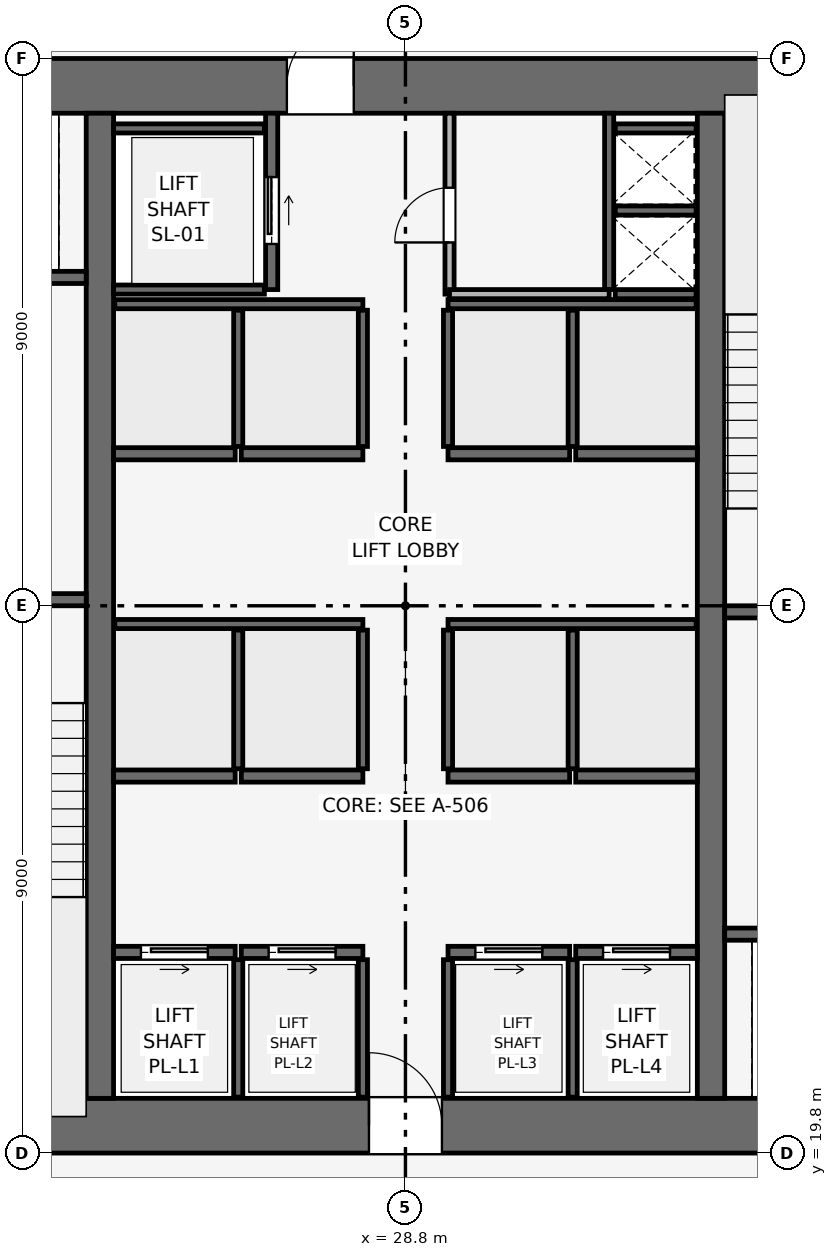
"""IFC4 building model, lengths in metres.
Left out: names, types, materials, properties, quantities, classifications, styles, units other than length and angle.
Written with IfcOpenShell. Run it as: python <this file> out.ifc"""

import sys

from ifc_helpers import new_model, si_unit, direction, frame, frame_2d, origin, place, context, subcontext, project, spatial, rectangle, extrude, element, fill, save


model = new_model("IFC4")
c1 = context("Model", 3, precision=1e-05, world=origin(), true_north=direction((0.0, 1.0)))
c2 = subcontext(c1, "Body", "Model", "MODEL_VIEW")
j1 = project(units=[si_unit("LENGTHUNIT", "METRE"), si_unit("PLANEANGLEUNIT", "RADIAN")], contexts=[c1])
p1 = place(None, origin())
s1 = spatial("IfcSite", under=j1, at=p1, CompositionType="ELEMENT")
p2 = place(p1, origin())
s2 = spatial("IfcBuilding", under=s1, at=p2, CompositionType="ELEMENT")
p3 = place(p2, frame((0.0, 0.0, 121.2)))
s3 = spatial("IfcBuildingStorey", under=s2, at=p3, CompositionType="ELEMENT", Elevation=121.2)
p4 = place(p3, frame((19.8, 20.25, 0.0), z_axis=(0.0, 0.0, 1.0), x_axis=(1.0, 0.0, 0.0)))
e1 = element("IfcWall", 1, at=p4, inside=s3, PredefinedType="SHEAR", context=c2, shape_type="SweptSolid", body=[
    extrude(rectangle(XDim=18.0, YDim=0.9, at=frame_2d((9.0, 0.0))), origin(), (0.0, 0.0, 1.0), 3.9),
])
p5 = place(p4, frame((8.4, 0.0, 0.0)))
e2 = element("IfcOpeningElement", 2, at=p5, cuts=e1, PredefinedType="OPENING", context=c2, shape_type="SweptSolid", body=[
    extrude(rectangle(XDim=1.2, YDim=2.2, at=frame_2d((0.6, 1.1))), frame((0.0, 0.46, 0.0), z_axis=(0.0, -1.0, 0.0), x_axis=(1.0, 0.0, 0.0)), (0.0, 0.0, 1.0), 0.92),
])
p6 = place(p3, frame((19.8, 37.35, 0.0), z_axis=(0.0, 0.0, 1.0), x_axis=(1.0, 0.0, 0.0)))
e3 = element("IfcWall", 3, at=p6, inside=s3, PredefinedType="SHEAR", context=c2, shape_type="SweptSolid", body=[
    extrude(rectangle(XDim=18.0, YDim=0.9, at=frame_2d((9.0, 0.0))), origin(), (0.0, 0.0, 1.0), 3.9),
])
p7 = place(p6, frame((7.05, 0.0, 0.0)))
e4 = element("IfcOpeningElement", 4, at=p7, cuts=e3, PredefinedType="OPENING", context=c2, shape_type="SweptSolid", body=[
    extrude(rectangle(XDim=1.1, YDim=2.15, at=frame_2d((0.55, 1.075))), frame((0.0, 0.46, 0.0), z_axis=(0.0, -1.0, 0.0), x_axis=(1.0, 0.0, 0.0)), (0.0, 0.0, 1.0), 0.92),
])
for number, where, z_axis, x_axis in (
    (5, (23.775, 20.7, 0.0), (0.0, 0.0, 1.0), (0.0, 1.0, 0.0)),
    (6, (33.825, 20.7, 0.0), (0.0, 0.0, 1.0), (0.0, 1.0, 0.0)),
):
    element("IfcWall", number, at=place(p3, frame(where, z_axis=z_axis, x_axis=x_axis)), inside=s3, PredefinedType="SHEAR", context=c2, shape_type="SweptSolid", body=[
        extrude(rectangle(XDim=16.2, YDim=0.45, at=frame_2d((8.1, 0.0))), origin(), (0.0, 0.0, 1.0), 3.9),
    ])
p8 = place(p3, frame((20.4, 28.9, 0.0), z_axis=(0.0, 0.0, 1.0), x_axis=(1.0, 0.0, 0.0)))
e7 = element("IfcWall", 7, at=p8, inside=s3, PredefinedType="SHEAR", context=c2, shape_type="SweptSolid", body=[
    extrude(rectangle(XDim=3.15, YDim=0.2, at=frame_2d((1.575, 0.0))), origin(), (0.0, 0.0, 1.0), 3.65),
])
p9 = place(p8, frame((0.8, 0.0, 0.0)))
e8 = element("IfcOpeningElement", 8, at=p9, cuts=e7, PredefinedType="OPENING", context=c2, shape_type="SweptSolid", body=[
    extrude(rectangle(XDim=1.0, YDim=2.1, at=frame_2d((0.5, 1.05))), frame((0.0, 0.11, 0.0), z_axis=(0.0, -1.0, 0.0), x_axis=(1.0, 0.0, 0.0)), (0.0, 0.0, 1.0), 0.22),
])
p10 = place(p3, frame((34.05, 28.7, 0.0), z_axis=(0.0, 0.0, 1.0), x_axis=(1.0, 0.0, 0.0)))
e9 = element("IfcWall", 9, at=p10, inside=s3, PredefinedType="SHEAR", context=c2, shape_type="SweptSolid", body=[
    extrude(rectangle(XDim=3.15, YDim=0.2, at=frame_2d((1.575, 0.0))), origin(), (0.0, 0.0, 1.0), 3.65),
])
p11 = place(p10, frame((0.8, 0.0, 0.0)))
e10 = element("IfcOpeningElement", 10, at=p11, cuts=e9, PredefinedType="OPENING", context=c2, shape_type="SweptSolid", body=[
    extrude(rectangle(XDim=1.0, YDim=2.1, at=frame_2d((0.5, 1.05))), frame((0.0, 0.11, 0.0), z_axis=(0.0, -1.0, 0.0), x_axis=(1.0, 0.0, 0.0)), (0.0, 0.0, 1.0), 0.22),
])
p12 = place(p3, frame((32.15, 34.0, 0.0), z_axis=(0.0, 0.0, 1.0), x_axis=(0.0, 1.0, 0.0)))
e11 = element("IfcWall", 11, at=p12, inside=s3, PredefinedType="SHEAR", context=c2, shape_type="SweptSolid", body=[
    extrude(rectangle(XDim=2.9, YDim=0.15, at=frame_2d((1.45, 0.0))), origin(), (0.0, 0.0, 1.0), 3.65),
])
for number, where, z_axis, x_axis in (
    (12, (32.25, 33.925, 0.0), (0.0, 0.0, 1.0), (1.0, 0.0, 0.0)),
    (13, (32.25, 35.3, 0.0), (0.0, 0.0, 1.0), (1.0, 0.0, 0.0)),
):
    element("IfcWall", number, at=place(p3, frame(where, z_axis=z_axis, x_axis=x_axis)), inside=s3, PredefinedType="SHEAR", context=c2, shape_type="SweptSolid", body=[
        extrude(rectangle(XDim=1.33, YDim=0.15, at=frame_2d((0.665, 0.0))), origin(), (0.0, 0.0, 1.0), 3.65),
    ])
p13 = place(p3, frame((20.5, 34.2, 0.0), z_axis=(0.0, 0.0, 1.0), x_axis=(1.0, 0.0, 0.0)))
e14 = element("IfcWall", 14, at=p13, inside=s3, PredefinedType="SHEAR", context=c2, shape_type="SweptSolid", body=[
    extrude(rectangle(XDim=3.05, YDim=0.2, at=frame_2d((1.525, 0.0))), origin(), (0.0, 0.0, 1.0), 3.65),
])
p14 = place(p13, frame((0.75, 0.0, 0.0)))
e15 = element("IfcOpeningElement", 15, at=p14, cuts=e14, PredefinedType="OPENING", context=c2, shape_type="SweptSolid", body=[
    extrude(rectangle(XDim=1.1, YDim=2.15, at=frame_2d((0.55, 1.075))), frame((0.0, 0.11, 0.0), z_axis=(0.0, -1.0, 0.0), x_axis=(1.0, 0.0, 0.0)), (0.0, 0.0, 1.0), 0.22),
])
p15 = place(p3, frame((34.05, 23.4, 0.0), z_axis=(0.0, 0.0, 1.0), x_axis=(1.0, 0.0, 0.0)))
e16 = element("IfcWall", 16, at=p15, inside=s3, PredefinedType="SHEAR", context=c2, shape_type="SweptSolid", body=[
    extrude(rectangle(XDim=3.05, YDim=0.2, at=frame_2d((1.525, 0.0))), origin(), (0.0, 0.0, 1.0), 3.65),
])
p16 = place(p15, frame((1.2, 0.0, 0.0)))
e17 = element("IfcOpeningElement", 17, at=p16, cuts=e16, PredefinedType="OPENING", context=c2, shape_type="SweptSolid", body=[
    extrude(rectangle(XDim=1.1, YDim=2.15, at=frame_2d((0.55, 1.075))), frame((0.0, 0.11, 0.0), z_axis=(0.0, -1.0, 0.0), x_axis=(1.0, 0.0, 0.0)), (0.0, 0.0, 1.0), 0.22),
])
p17 = place(p3, frame((26.6, 34.0, 0.0), z_axis=(0.0, 0.0, 1.0), x_axis=(0.0, 1.0, 0.0)))
e18 = element("IfcWall", 18, at=p17, inside=s3, PredefinedType="SHEAR", context=c2, shape_type="SweptSolid", body=[
    extrude(rectangle(XDim=2.9, YDim=0.2, at=frame_2d((1.45, 0.0))), origin(), (0.0, 0.0, 1.0), 3.65),
])
p18 = place(p17, frame((0.75, 0.0, 0.0)))
e19 = element("IfcOpeningElement", 19, at=p18, cuts=e18, PredefinedType="OPENING", context=c2, shape_type="SweptSolid", body=[
    extrude(rectangle(XDim=1.1, YDim=2.15, at=frame_2d((0.55, 1.075))), frame((0.0, 0.11, 0.0), z_axis=(0.0, -1.0, 0.0), x_axis=(1.0, 0.0, 0.0)), (0.0, 0.0, 1.0), 0.22),
])
for number, where, z_axis, x_axis in (
    (20, (24.0, 34.0, 0.0), (0.0, 0.0, 1.0), (1.0, 0.0, 0.0)),
    (21, (24.0, 36.65, 0.0), (0.0, 0.0, 1.0), (1.0, 0.0, 0.0)),
):
    element("IfcWall", number, at=place(p3, frame(where, z_axis=z_axis, x_axis=x_axis)), inside=s3, PredefinedType="SHEAR", context=c2, shape_type="SweptSolid", body=[
        extrude(rectangle(XDim=2.48, YDim=0.15, at=frame_2d((1.24, 0.0))), origin(), (0.0, 0.0, 1.0), 3.65),
    ])
p19 = place(p3, frame((24.0, 23.1, 0.0), z_axis=(0.0, 0.0, 1.0), x_axis=(1.0, 0.0, 0.0)))
e22 = element("IfcWall", 22, at=p19, inside=s3, PredefinedType="SHEAR", context=c2, shape_type="SweptSolid", body=[
    extrude(rectangle(XDim=2.0, YDim=0.2, at=frame_2d((1.0, 0.0))), origin(), (0.0, 0.0, 1.0), 3.65),
])
p20 = place(p19, frame((0.45, 0.0, 0.0)))
e23 = element("IfcOpeningElement", 23, at=p20, cuts=e22, PredefinedType="OPENING", context=c2, shape_type="SweptSolid", body=[
    extrude(rectangle(XDim=1.1, YDim=2.15, at=frame_2d((0.55, 1.075))), frame((0.0, 0.11, 0.0), z_axis=(0.0, -1.0, 0.0), x_axis=(1.0, 0.0, 0.0)), (0.0, 0.0, 1.0), 0.22),
])
p21 = place(p3, frame((26.1, 23.1, 0.0), z_axis=(0.0, 0.0, 1.0), x_axis=(1.0, 0.0, 0.0)))
e24 = element("IfcWall", 24, at=p21, inside=s3, PredefinedType="SHEAR", context=c2, shape_type="SweptSolid", body=[
    extrude(rectangle(XDim=2.0, YDim=0.2, at=frame_2d((1.0, 0.0))), origin(), (0.0, 0.0, 1.0), 3.65),
])
p22 = place(p21, frame((0.45, 0.0, 0.0)))
e25 = element("IfcOpeningElement", 25, at=p22, cuts=e24, PredefinedType="OPENING", context=c2, shape_type="SweptSolid", body=[
    extrude(rectangle(XDim=1.1, YDim=2.15, at=frame_2d((0.55, 1.075))), frame((0.0, 0.11, 0.0), z_axis=(0.0, -1.0, 0.0), x_axis=(1.0, 0.0, 0.0)), (0.0, 0.0, 1.0), 0.22),
])
p23 = place(p3, frame((29.5, 23.1, 0.0), z_axis=(0.0, 0.0, 1.0), x_axis=(1.0, 0.0, 0.0)))
e26 = element("IfcWall", 26, at=p23, inside=s3, PredefinedType="SHEAR", context=c2, shape_type="SweptSolid", body=[
    extrude(rectangle(XDim=2.0, YDim=0.2, at=frame_2d((1.0, 0.0))), origin(), (0.0, 0.0, 1.0), 3.65),
])
p24 = place(p23, frame((0.45, 0.0, 0.0)))
e27 = element("IfcOpeningElement", 27, at=p24, cuts=e26, PredefinedType="OPENING", context=c2, shape_type="SweptSolid", body=[
    extrude(rectangle(XDim=1.1, YDim=2.15, at=frame_2d((0.55, 1.075))), frame((0.0, 0.11, 0.0), z_axis=(0.0, -1.0, 0.0), x_axis=(1.0, 0.0, 0.0)), (0.0, 0.0, 1.0), 0.22),
])
p25 = place(p3, frame((31.6, 23.1, 0.0), z_axis=(0.0, 0.0, 1.0), x_axis=(1.0, 0.0, 0.0)))
e28 = element("IfcWall", 28, at=p25, inside=s3, PredefinedType="SHEAR", context=c2, shape_type="SweptSolid", body=[
    extrude(rectangle(XDim=2.0, YDim=0.2, at=frame_2d((1.0, 0.0))), origin(), (0.0, 0.0, 1.0), 3.65),
])
p26 = place(p25, frame((0.45, 0.0, 0.0)))
e29 = element("IfcOpeningElement", 29, at=p26, cuts=e28, PredefinedType="OPENING", context=c2, shape_type="SweptSolid", body=[
    extrude(rectangle(XDim=1.1, YDim=2.15, at=frame_2d((0.55, 1.075))), frame((0.0, 0.11, 0.0), z_axis=(0.0, -1.0, 0.0), x_axis=(1.0, 0.0, 0.0)), (0.0, 0.0, 1.0), 0.22),
])
for number, where, z_axis, x_axis in (
    (30, (24.0, 26.0, 0.0), (0.0, 0.0, 1.0), (1.0, 0.0, 0.0)),
    (31, (26.1, 26.0, 0.0), (0.0, 0.0, 1.0), (1.0, 0.0, 0.0)),
    (32, (29.5, 26.0, 0.0), (0.0, 0.0, 1.0), (1.0, 0.0, 0.0)),
    (33, (31.6, 26.0, 0.0), (0.0, 0.0, 1.0), (1.0, 0.0, 0.0)),
    (34, (24.0, 31.3, 0.0), (0.0, 0.0, 1.0), (1.0, 0.0, 0.0)),
    (35, (26.1, 31.3, 0.0), (0.0, 0.0, 1.0), (1.0, 0.0, 0.0)),
    (36, (29.5, 31.3, 0.0), (0.0, 0.0, 1.0), (1.0, 0.0, 0.0)),
    (37, (31.6, 31.3, 0.0), (0.0, 0.0, 1.0), (1.0, 0.0, 0.0)),
):
    element("IfcWall", number, at=place(p3, frame(where, z_axis=z_axis, x_axis=x_axis)), inside=s3, PredefinedType="SHEAR", context=c2, shape_type="SweptSolid", body=[
        extrude(rectangle(XDim=2.0, YDim=0.2, at=frame_2d((1.0, 0.0))), origin(), (0.0, 0.0, 1.0), 3.65),
    ])
p27 = place(p3, frame((32.25, 36.65, 0.0), z_axis=(0.0, 0.0, 1.0), x_axis=(1.0, 0.0, 0.0)))
e38 = element("IfcWall", 38, at=p27, inside=s3, PredefinedType="SHEAR", context=c2, shape_type="SweptSolid", body=[
    extrude(rectangle(XDim=1.33, YDim=0.15, at=frame_2d((0.665, 0.0))), origin(), (0.0, 0.0, 1.0), 3.65),
])
for number, where, z_axis, x_axis in (
    (39, (26.05, 20.72, 0.0), (0.0, 0.0, 1.0), (0.0, 1.0, 0.0)),
    (40, (28.1, 20.72, 0.0), (0.0, 0.0, 1.0), (0.0, 1.0, 0.0)),
    (41, (29.5, 20.72, 0.0), (0.0, 0.0, 1.0), (0.0, 1.0, 0.0)),
    (42, (31.55, 20.72, 0.0), (0.0, 0.0, 1.0), (0.0, 1.0, 0.0)),
):
    element("IfcWall", number, at=place(p3, frame(where, z_axis=z_axis, x_axis=x_axis)), inside=s3, PredefinedType="SHEAR", context=c2, shape_type="SweptSolid", body=[
        extrude(rectangle(XDim=2.26, YDim=0.15, at=frame_2d((1.13, 0.0))), origin(), (0.0, 0.0, 1.0), 3.65),
    ])
for number, where, z_axis, x_axis in (
    (43, (24.02, 28.5, 0.0), (0.0, 0.0, 1.0), (1.0, 0.0, 0.0)),
    (44, (29.5, 28.5, 0.0), (0.0, 0.0, 1.0), (1.0, 0.0, 0.0)),
):
    element("IfcWall", number, at=place(p3, frame(where, z_axis=z_axis, x_axis=x_axis)), inside=s3, PredefinedType="SHEAR", context=c2, shape_type="SweptSolid", body=[
        extrude(rectangle(XDim=4.08, YDim=0.15, at=frame_2d((2.04, 0.0))), origin(), (0.0, 0.0, 1.0), 3.65),
    ])
for number, where, z_axis, x_axis in (
    (45, (26.05, 26.12, 0.0), (0.0, 0.0, 1.0), (0.0, 1.0, 0.0)),
    (46, (28.1, 26.12, 0.0), (0.0, 0.0, 1.0), (0.0, 1.0, 0.0)),
    (47, (29.5, 26.12, 0.0), (0.0, 0.0, 1.0), (0.0, 1.0, 0.0)),
    (48, (31.55, 26.12, 0.0), (0.0, 0.0, 1.0), (0.0, 1.0, 0.0)),
):
    element("IfcWall", number, at=place(p3, frame(where, z_axis=z_axis, x_axis=x_axis)), inside=s3, PredefinedType="SHEAR", context=c2, shape_type="SweptSolid", body=[
        extrude(rectangle(XDim=2.28, YDim=0.15, at=frame_2d((1.14, 0.0))), origin(), (0.0, 0.0, 1.0), 3.65),
    ])
for number, where, z_axis, x_axis in (
    (49, (24.02, 33.76, 0.0), (0.0, 0.0, 1.0), (1.0, 0.0, 0.0)),
    (50, (29.5, 33.76, 0.0), (0.0, 0.0, 1.0), (1.0, 0.0, 0.0)),
):
    element("IfcWall", number, at=place(p3, frame(where, z_axis=z_axis, x_axis=x_axis)), inside=s3, PredefinedType="SHEAR", context=c2, shape_type="SweptSolid", body=[
        extrude(rectangle(XDim=4.08, YDim=0.15, at=frame_2d((2.04, 0.0))), origin(), (0.0, 0.0, 1.0), 3.65),
    ])
for number, where, z_axis, x_axis in (
    (51, (26.05, 31.42, 0.0), (0.0, 0.0, 1.0), (0.0, 1.0, 0.0)),
    (52, (28.1, 31.42, 0.0), (0.0, 0.0, 1.0), (0.0, 1.0, 0.0)),
    (53, (29.5, 31.42, 0.0), (0.0, 0.0, 1.0), (0.0, 1.0, 0.0)),
    (54, (31.55, 31.42, 0.0), (0.0, 0.0, 1.0), (0.0, 1.0, 0.0)),
):
    element("IfcWall", number, at=place(p3, frame(where, z_axis=z_axis, x_axis=x_axis)), inside=s3, PredefinedType="SHEAR", context=c2, shape_type="SweptSolid", body=[
        extrude(rectangle(XDim=2.24, YDim=0.15, at=frame_2d((1.12, 0.0))), origin(), (0.0, 0.0, 1.0), 3.65),
    ])
p28 = place(p3, frame((29.525, 33.925, 0.0), z_axis=(0.0, 0.0, 1.0), x_axis=(0.0, 1.0, 0.0)))
e55 = element("IfcWall", 55, at=p28, inside=s3, PredefinedType="PARTITIONING", context=c2, shape_type="SweptSolid", body=[
    extrude(rectangle(XDim=2.975, YDim=0.15, at=frame_2d((1.487, 0.0))), origin(), (0.0, 0.0, 1.0), 3.65),
])
p29 = place(p28, frame((0.85, 0.0, 0.0)))
e56 = element("IfcOpeningElement", 56, at=p29, cuts=e55, PredefinedType="OPENING", context=c2, shape_type="SweptSolid", body=[
    extrude(rectangle(XDim=0.9, YDim=2.1, at=frame_2d((0.45, 1.05))), frame((0.0, 0.085, 0.0), z_axis=(0.0, -1.0, 0.0), x_axis=(1.0, 0.0, 0.0)), (0.0, 0.0, 1.0), 0.17),
])
p30 = place(p3, frame((29.525, 33.925, 0.0), z_axis=(0.0, 0.0, 1.0), x_axis=(1.0, 0.0, 0.0)))
e57 = element("IfcWall", 57, at=p30, inside=s3, PredefinedType="PARTITIONING", context=c2, shape_type="SweptSolid", body=[
    extrude(rectangle(XDim=2.625, YDim=0.15, at=frame_2d((1.312, 0.0))), origin(), (0.0, 0.0, 1.0), 3.65),
])
p31 = place(p18, origin())
e58 = element("IfcDoor", 58, at=p31, inside=s3, OperationType="SLIDING_TO_RIGHT", PredefinedType="DOOR", context=c2, shape_type="SweptSolid", body=[
    extrude(rectangle(XDim=1.1, YDim=2.15, at=frame_2d((0.55, 1.075))), frame((0.0, 0.025, 0.0), z_axis=(0.0, -1.0, 0.0), x_axis=(1.0, 0.0, 0.0)), (0.0, 0.0, 1.0), 0.05),
])
fill(e19, e58)
p32 = place(p20, origin())
e59 = element("IfcDoor", 59, at=p32, inside=s3, OperationType="SLIDING_TO_RIGHT", PredefinedType="DOOR", context=c2, shape_type="SweptSolid", body=[
    extrude(rectangle(XDim=1.1, YDim=2.15, at=frame_2d((0.55, 1.075))), frame((0.0, 0.025, 0.0), z_axis=(0.0, -1.0, 0.0), x_axis=(1.0, 0.0, 0.0)), (0.0, 0.0, 1.0), 0.05),
])
fill(e23, e59)
p33 = place(p22, origin())
e60 = element("IfcDoor", 60, at=p33, inside=s3, OperationType="SLIDING_TO_RIGHT", PredefinedType="DOOR", context=c2, shape_type="SweptSolid", body=[
    extrude(rectangle(XDim=1.1, YDim=2.15, at=frame_2d((0.55, 1.075))), frame((0.0, 0.025, 0.0), z_axis=(0.0, -1.0, 0.0), x_axis=(1.0, 0.0, 0.0)), (0.0, 0.0, 1.0), 0.05),
])
fill(e25, e60)
p34 = place(p24, origin())
e61 = element("IfcDoor", 61, at=p34, inside=s3, OperationType="SLIDING_TO_RIGHT", PredefinedType="DOOR", context=c2, shape_type="SweptSolid", body=[
    extrude(rectangle(XDim=1.1, YDim=2.15, at=frame_2d((0.55, 1.075))), frame((0.0, 0.025, 0.0), z_axis=(0.0, -1.0, 0.0), x_axis=(1.0, 0.0, 0.0)), (0.0, 0.0, 1.0), 0.05),
])
fill(e27, e61)
p35 = place(p26, origin())
e62 = element("IfcDoor", 62, at=p35, inside=s3, OperationType="SLIDING_TO_RIGHT", PredefinedType="DOOR", context=c2, shape_type="SweptSolid", body=[
    extrude(rectangle(XDim=1.1, YDim=2.15, at=frame_2d((0.55, 1.075))), frame((0.0, 0.025, 0.0), z_axis=(0.0, -1.0, 0.0), x_axis=(1.0, 0.0, 0.0)), (0.0, 0.0, 1.0), 0.05),
])
fill(e29, e62)
p36 = place(p29, origin())
e63 = element("IfcDoor", 63, at=p36, inside=s3, OperationType="SINGLE_SWING_LEFT", PredefinedType="DOOR", context=c2, shape_type="SweptSolid", body=[
    extrude(rectangle(XDim=0.9, YDim=2.1, at=frame_2d((0.45, 1.05))), frame((0.0, 0.025, 0.0), z_axis=(0.0, -1.0, 0.0), x_axis=(1.0, 0.0, 0.0)), (0.0, 0.0, 1.0), 0.05),
])
fill(e56, e63)
p37 = place(p5, origin())
e64 = element("IfcDoor", 64, at=p37, inside=s3, OperationType="SINGLE_SWING_LEFT", PredefinedType="DOOR", context=c2, shape_type="SweptSolid", body=[
    extrude(rectangle(XDim=1.2, YDim=2.2, at=frame_2d((0.6, 1.1))), frame((0.0, 0.025, 0.0), z_axis=(0.0, -1.0, 0.0), x_axis=(1.0, 0.0, 0.0)), (0.0, 0.0, 1.0), 0.05),
])
fill(e2, e64)
p38 = place(p7, origin())
e65 = element("IfcDoor", 65, at=p38, inside=s3, OperationType="SINGLE_SWING_RIGHT", PredefinedType="DOOR", context=c2, shape_type="SweptSolid", body=[
    extrude(rectangle(XDim=1.1, YDim=2.15, at=frame_2d((0.55, 1.075))), frame((0.0, 0.025, 0.0), z_axis=(0.0, -1.0, 0.0), x_axis=(1.0, 0.0, 0.0)), (0.0, 0.0, 1.0), 0.05),
])
fill(e4, e65)
save(model, sys.argv[1])
